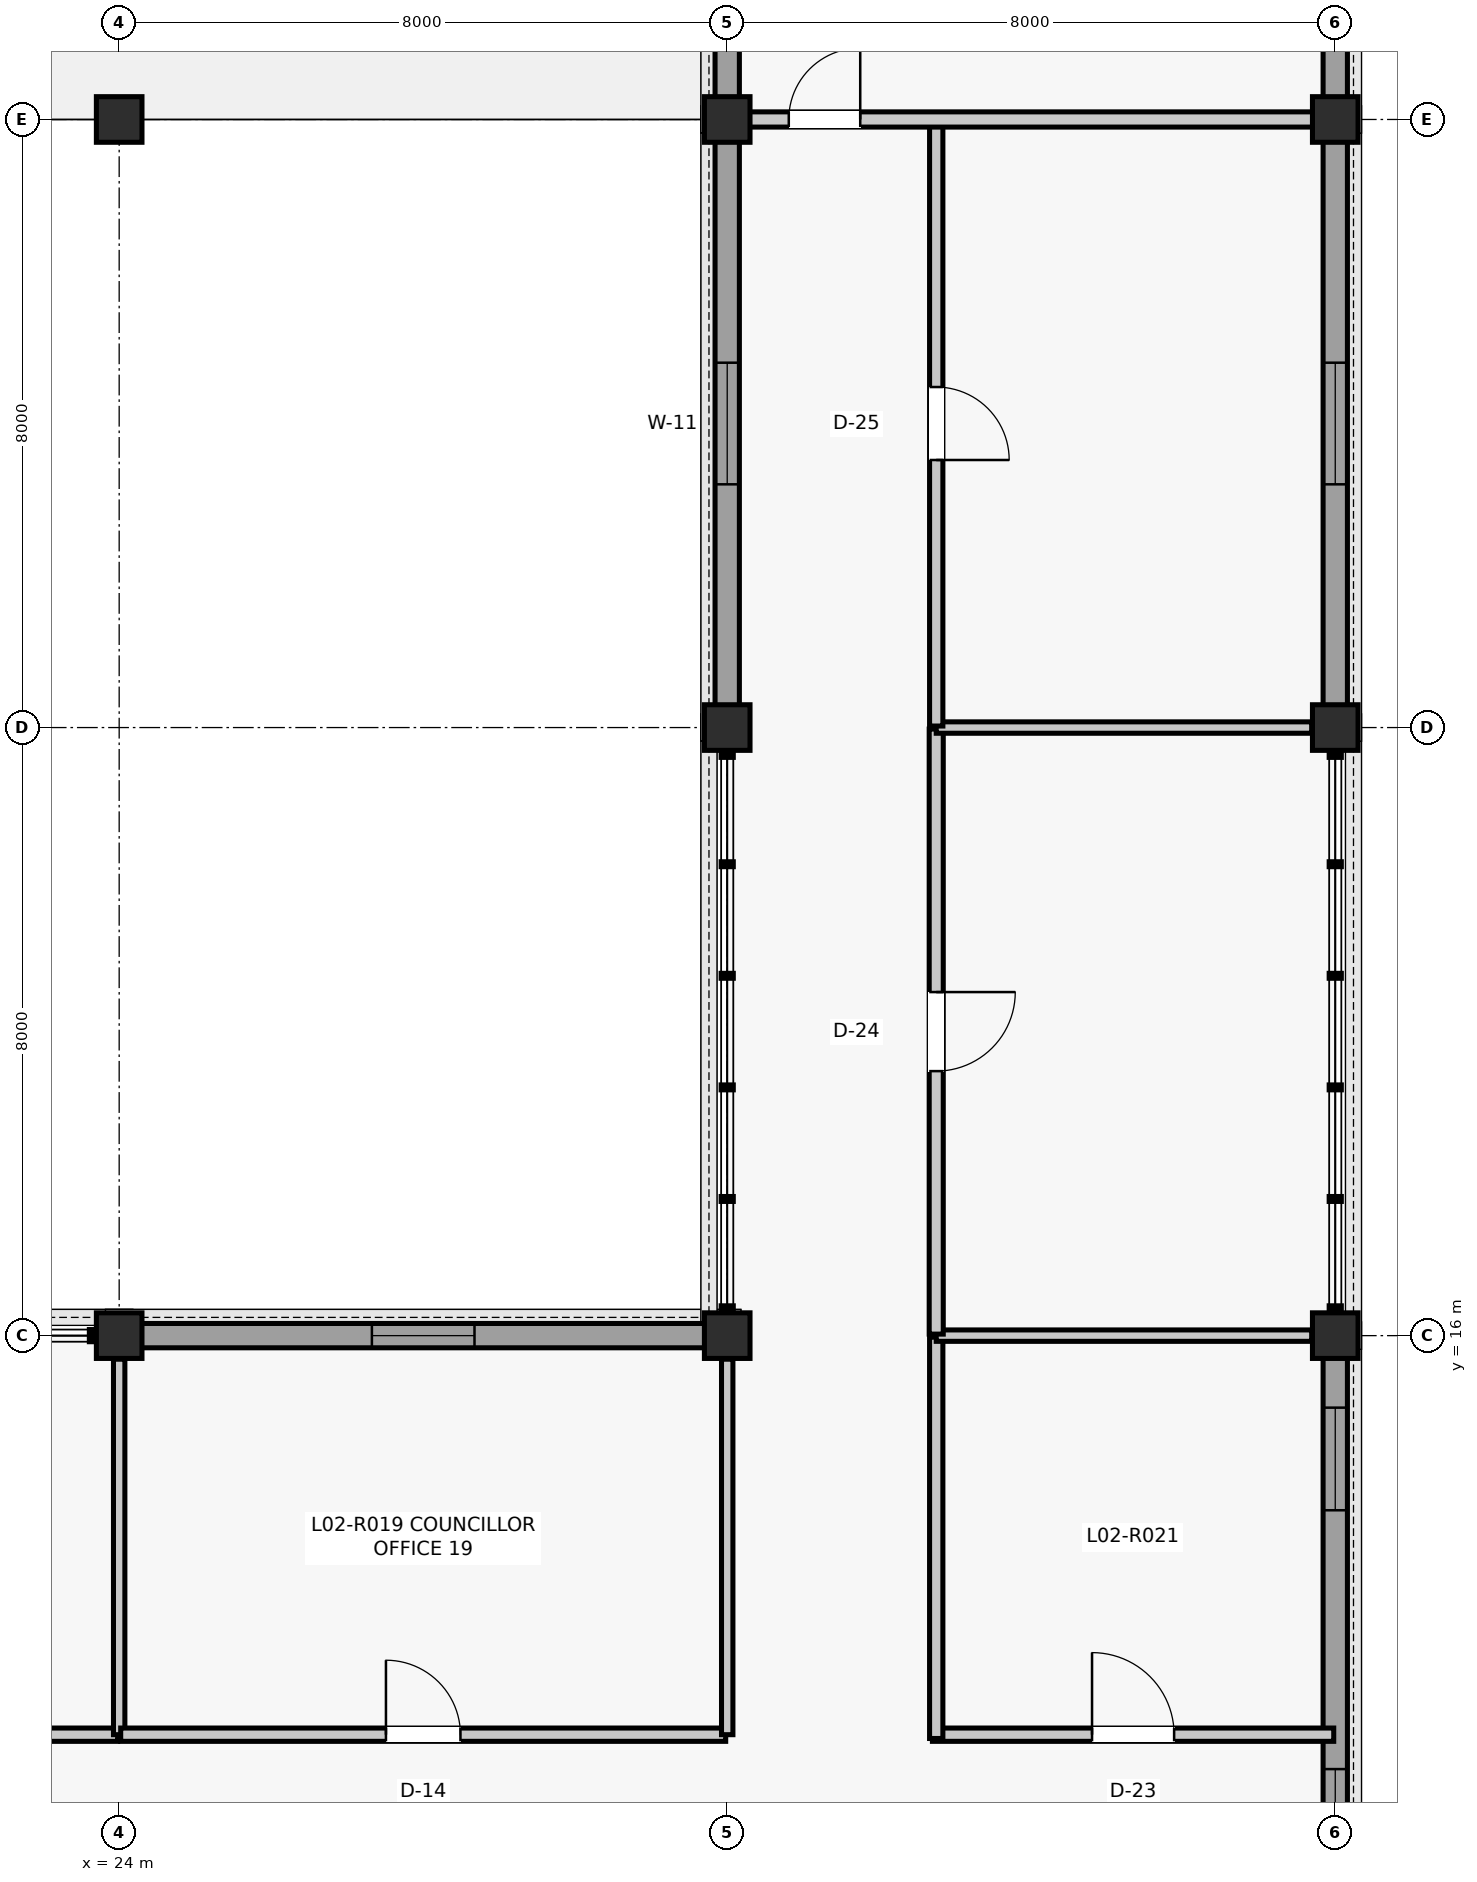
"""IFC4 building model, lengths in metres.
Left out: names, types, materials, properties, quantities, classifications, styles, units other than length and angle.
Written with IfcOpenShell. Run it as: python <this file> out.ifc"""

import sys

from ifc_helpers import new_model, si_unit, direction, frame, frame_2d, origin, origin_2d, place, context, subcontext, project, spatial, rectangle, extrude, element, fill, save


model = new_model("IFC4")
c1 = context("Model", 3, precision=1e-05, world=origin(), true_north=direction((0.0, 1.0)))
c2 = subcontext(c1, "Body", "Model", "MODEL_VIEW")
j1 = project(units=[si_unit("LENGTHUNIT", "METRE"), si_unit("PLANEANGLEUNIT", "RADIAN")], contexts=[c1])
p1 = place(None, origin())
s1 = spatial("IfcSite", under=j1, at=p1, CompositionType="ELEMENT")
p2 = place(p1, origin())
s2 = spatial("IfcBuilding", under=s1, at=p2, CompositionType="ELEMENT")
p3 = place(p2, frame((0.0, 0.0, 9.9)))
s3 = spatial("IfcBuildingStorey", under=s2, at=p3, CompositionType="ELEMENT", Elevation=9.9)
for number, where, z_axis, x_axis in (
    (1, (24.0, 16.0, 0.0), (0.0, 0.0, 1.0), (1.0, 0.0, 0.0)),
    (2, (24.0, 32.0, 0.0), (0.0, 0.0, 1.0), (1.0, 0.0, 0.0)),
    (3, (32.0, 16.0, 0.0), (0.0, 0.0, 1.0), (1.0, 0.0, 0.0)),
    (4, (32.0, 24.0, 0.0), (0.0, 0.0, 1.0), (1.0, 0.0, 0.0)),
    (5, (32.0, 32.0, 0.0), (0.0, 0.0, 1.0), (1.0, 0.0, 0.0)),
    (6, (40.0, 16.0, 0.0), (0.0, 0.0, 1.0), (1.0, 0.0, 0.0)),
    (7, (40.0, 24.0, 0.0), (0.0, 0.0, 1.0), (1.0, 0.0, 0.0)),
    (8, (40.0, 32.0, 0.0), (0.0, 0.0, 1.0), (1.0, 0.0, 0.0)),
):
    element("IfcColumn", number, at=place(p3, frame(where, z_axis=z_axis, x_axis=x_axis)), inside=s3, PredefinedType="COLUMN", context=c2, shape_type="SweptSolid", body=[
        extrude(rectangle(XDim=0.6, YDim=0.6, at=origin_2d()), origin(), (0.0, 0.0, 1.0), 3.96),
    ])
p4 = place(p3, frame((24.285, 16.0, 0.0), z_axis=(0.0, 0.0, 1.0), x_axis=(1.0, 0.0, 0.0)))
e9 = element("IfcWall", 9, at=p4, inside=s3, PredefinedType="SOLIDWALL", context=c2, shape_type="SweptSolid", body=[
    extrude(rectangle(XDim=7.43, YDim=0.32, at=frame_2d((3.715, 0.0))), origin(), (0.0, 0.0, 1.0), 3.179),
])
p5 = place(p4, frame((3.04, 0.0, 0.9)))
e10 = element("IfcOpeningElement", 10, at=p5, cuts=e9, PredefinedType="OPENING", context=c2, shape_type="SweptSolid", body=[
    extrude(rectangle(XDim=1.35, YDim=1.9, at=frame_2d((0.675, 0.95))), frame((0.0, 0.17, 0.0), z_axis=(0.0, -1.0, 0.0), x_axis=(1.0, 0.0, 0.0)), (0.0, 0.0, 1.0), 0.34),
])
p6 = place(p3, frame((40.0, 8.285, 0.0), z_axis=(0.0, 0.0, 1.0), x_axis=(0.0, 1.0, 0.0)))
e11 = element("IfcWall", 11, at=p6, inside=s3, PredefinedType="SOLIDWALL", context=c2, shape_type="SweptSolid", body=[
    extrude(rectangle(XDim=7.43, YDim=0.32, at=frame_2d((3.715, 0.0))), origin(), (0.0, 0.0, 1.0), 3.295),
])
p7 = place(p6, frame((0.662, 0.0, 0.95)))
e12 = element("IfcOpeningElement", 12, at=p7, cuts=e11, PredefinedType="OPENING", context=c2, shape_type="SweptSolid", body=[
    extrude(rectangle(XDim=1.35, YDim=1.9, at=frame_2d((0.675, 0.95))), frame((0.0, 0.17, 0.0), z_axis=(0.0, -1.0, 0.0), x_axis=(1.0, 0.0, 0.0)), (0.0, 0.0, 1.0), 0.34),
])
p8 = place(p6, frame((5.417, 0.0, 0.95)))
e13 = element("IfcOpeningElement", 13, at=p8, cuts=e11, PredefinedType="OPENING", context=c2, shape_type="SweptSolid", body=[
    extrude(rectangle(XDim=1.35, YDim=1.9, at=frame_2d((0.675, 0.95))), frame((0.0, 0.17, 0.0), z_axis=(0.0, -1.0, 0.0), x_axis=(1.0, 0.0, 0.0)), (0.0, 0.0, 1.0), 0.34),
])
p9 = place(p3, frame((32.0, 24.285, 0.0), z_axis=(0.0, 0.0, 1.0), x_axis=(0.0, 1.0, 0.0)))
e14 = element("IfcWall", 14, at=p9, inside=s3, PredefinedType="SOLIDWALL", context=c2, shape_type="SweptSolid", body=[
    extrude(rectangle(XDim=7.43, YDim=0.32, at=frame_2d((3.715, 0.0))), origin(), (0.0, 0.0, 1.0), 3.243),
])
p10 = place(p9, frame((2.915, 0.0, 0.9)))
e15 = element("IfcOpeningElement", 15, at=p10, cuts=e14, PredefinedType="OPENING", context=c2, shape_type="SweptSolid", body=[
    extrude(rectangle(XDim=1.6, YDim=2.0, at=frame_2d((0.8, 1.0))), frame((0.0, 0.17, 0.0), z_axis=(0.0, -1.0, 0.0), x_axis=(1.0, 0.0, 0.0)), (0.0, 0.0, 1.0), 0.34),
])
p11 = place(p3, frame((40.0, 24.285, 0.0), z_axis=(0.0, 0.0, 1.0), x_axis=(0.0, 1.0, 0.0)))
e16 = element("IfcWall", 16, at=p11, inside=s3, PredefinedType="SOLIDWALL", context=c2, shape_type="SweptSolid", body=[
    extrude(rectangle(XDim=7.43, YDim=0.32, at=frame_2d((3.715, 0.0))), origin(), (0.0, 0.0, 1.0), 3.299),
])
p12 = place(p11, frame((2.915, 0.0, 0.9)))
e17 = element("IfcOpeningElement", 17, at=p12, cuts=e16, PredefinedType="OPENING", context=c2, shape_type="SweptSolid", body=[
    extrude(rectangle(XDim=1.6, YDim=2.0, at=frame_2d((0.8, 1.0))), frame((0.0, 0.17, 0.0), z_axis=(0.0, -1.0, 0.0), x_axis=(1.0, 0.0, 0.0)), (0.0, 0.0, 1.0), 0.34),
])
p13 = place(p3, frame((32.0, 32.285, 0.0), z_axis=(0.0, 0.0, 1.0), x_axis=(0.0, 1.0, 0.0)))
e18 = element("IfcWall", 18, at=p13, inside=s3, PredefinedType="SOLIDWALL", context=c2, shape_type="SweptSolid", body=[
    extrude(rectangle(XDim=7.43, YDim=0.32, at=frame_2d((3.715, 0.0))), origin(), (0.0, 0.0, 1.0), 3.299),
])
p14 = place(p13, frame((2.965, 0.0, 0.9)))
e19 = element("IfcOpeningElement", 19, at=p14, cuts=e18, PredefinedType="OPENING", context=c2, shape_type="SweptSolid", body=[
    extrude(rectangle(XDim=1.5, YDim=1.9, at=frame_2d((0.75, 0.95))), frame((0.0, 0.17, 0.0), z_axis=(0.0, -1.0, 0.0), x_axis=(1.0, 0.0, 0.0)), (0.0, 0.0, 1.0), 0.34),
])
p15 = place(p3, frame((40.0, 32.285, 0.0), z_axis=(0.0, 0.0, 1.0), x_axis=(0.0, 1.0, 0.0)))
e20 = element("IfcWall", 20, at=p15, inside=s3, PredefinedType="SOLIDWALL", context=c2, shape_type="SweptSolid", body=[
    extrude(rectangle(XDim=7.43, YDim=0.32, at=frame_2d((3.715, 0.0))), origin(), (0.0, 0.0, 1.0), 3.362),
])
p16 = place(p15, frame((2.965, 0.0, 0.9)))
e21 = element("IfcOpeningElement", 21, at=p16, cuts=e20, PredefinedType="OPENING", context=c2, shape_type="SweptSolid", body=[
    extrude(rectangle(XDim=1.5, YDim=1.9, at=frame_2d((0.75, 0.95))), frame((0.0, 0.17, 0.0), z_axis=(0.0, -1.0, 0.0), x_axis=(1.0, 0.0, 0.0)), (0.0, 0.0, 1.0), 0.34),
])
p17 = place(p3, frame((16.02, 10.75, 0.0), z_axis=(0.0, 0.0, 1.0), x_axis=(1.0, 0.0, 0.0)))
e22 = element("IfcWall", 22, at=p17, inside=s3, PredefinedType="PARTITIONING", context=c2, shape_type="SweptSolid", body=[
    extrude(rectangle(XDim=7.96, YDim=0.175, at=frame_2d((3.98, 0.0))), origin(), (0.0, 0.0, 1.0), 3.172),
])
p18 = place(p17, frame((3.355, 0.0, 0.0)))
e23 = element("IfcOpeningElement", 23, at=p18, cuts=e22, PredefinedType="OPENING", context=c2, shape_type="SweptSolid", body=[
    extrude(rectangle(XDim=1.25, YDim=2.18, at=frame_2d((0.625, 1.09))), frame((0.0, 0.097, 0.0), z_axis=(0.0, -1.0, 0.0), x_axis=(1.0, 0.0, 0.0)), (0.0, 0.0, 1.0), 0.195),
])
p19 = place(p3, frame((24.0, 10.75, 0.0), z_axis=(0.0, 0.0, 1.0), x_axis=(0.0, 1.0, 0.0)))
e24 = element("IfcWall", 24, at=p19, inside=s3, PredefinedType="PARTITIONING", context=c2, shape_type="SweptSolid", body=[
    extrude(rectangle(XDim=4.94, YDim=0.15, at=frame_2d((2.47, 0.0))), origin(), (0.0, 0.0, 1.0), 3.172),
])
p20 = place(p3, frame((24.02, 10.75, 0.0), z_axis=(0.0, 0.0, 1.0), x_axis=(1.0, 0.0, 0.0)))
e25 = element("IfcWall", 25, at=p20, inside=s3, PredefinedType="PARTITIONING", context=c2, shape_type="SweptSolid", body=[
    extrude(rectangle(XDim=7.96, YDim=0.175, at=frame_2d((3.98, 0.0))), origin(), (0.0, 0.0, 1.0), 3.172),
])
p21 = place(p20, frame((3.49, 0.0, 0.0)))
e26 = element("IfcOpeningElement", 26, at=p21, cuts=e25, PredefinedType="OPENING", context=c2, shape_type="SweptSolid", body=[
    extrude(rectangle(XDim=0.98, YDim=2.15, at=frame_2d((0.49, 1.075))), frame((0.0, 0.097, 0.0), z_axis=(0.0, -1.0, 0.0), x_axis=(1.0, 0.0, 0.0)), (0.0, 0.0, 1.0), 0.195),
])
p22 = place(p3, frame((32.0, 10.75, 0.0), z_axis=(0.0, 0.0, 1.0), x_axis=(0.0, 1.0, 0.0)))
e27 = element("IfcWall", 27, at=p22, inside=s3, PredefinedType="PARTITIONING", context=c2, shape_type="SweptSolid", body=[
    extrude(rectangle(XDim=4.94, YDim=0.15, at=frame_2d((2.47, 0.0))), origin(), (0.0, 0.0, 1.0), 3.242),
])
p23 = place(p3, frame((34.7, 10.75, 0.0), z_axis=(0.0, 0.0, 1.0), x_axis=(1.0, 0.0, 0.0)))
e28 = element("IfcWall", 28, at=p23, inside=s3, PredefinedType="PARTITIONING", context=c2, shape_type="SweptSolid", body=[
    extrude(rectangle(XDim=5.28, YDim=0.175, at=frame_2d((2.64, 0.0))), origin(), (0.0, 0.0, 1.0), 3.288),
])
p24 = place(p23, frame((2.1, 0.0, 0.0)))
e29 = element("IfcOpeningElement", 29, at=p24, cuts=e28, PredefinedType="OPENING", context=c2, shape_type="SweptSolid", body=[
    extrude(rectangle(XDim=1.08, YDim=2.2, at=frame_2d((0.54, 1.1))), frame((0.0, 0.097, 0.0), z_axis=(0.0, -1.0, 0.0), x_axis=(1.0, 0.0, 0.0)), (0.0, 0.0, 1.0), 0.195),
])
p25 = place(p3, frame((34.75, 10.7, 0.0), z_axis=(0.0, 0.0, 1.0), x_axis=(0.0, 1.0, 0.0)))
e30 = element("IfcWall", 30, at=p25, inside=s3, PredefinedType="PARTITIONING", context=c2, shape_type="SweptSolid", body=[
    extrude(rectangle(XDim=5.28, YDim=0.175, at=frame_2d((2.64, 0.0))), origin(), (0.0, 0.0, 1.0), 3.156),
])
p26 = place(p3, frame((34.75, 16.0, 0.0), z_axis=(0.0, 0.0, 1.0), x_axis=(1.0, 0.0, 0.0)))
e31 = element("IfcWall", 31, at=p26, inside=s3, PredefinedType="PARTITIONING", context=c2, shape_type="SweptSolid", body=[
    extrude(rectangle(XDim=4.94, YDim=0.15, at=frame_2d((2.47, 0.0))), origin(), (0.0, 0.0, 1.0), 3.156),
])
p27 = place(p3, frame((34.75, 16.02, 0.0), z_axis=(0.0, 0.0, 1.0), x_axis=(0.0, 1.0, 0.0)))
e32 = element("IfcWall", 32, at=p27, inside=s3, PredefinedType="PARTITIONING", context=c2, shape_type="SweptSolid", body=[
    extrude(rectangle(XDim=7.96, YDim=0.185, at=frame_2d((3.98, 0.0))), origin(), (0.0, 0.0, 1.0), 3.156),
])
p28 = place(p27, frame((3.46, 0.0, 0.0)))
e33 = element("IfcOpeningElement", 33, at=p28, cuts=e32, PredefinedType="OPENING", context=c2, shape_type="SweptSolid", body=[
    extrude(rectangle(XDim=1.04, YDim=2.18, at=frame_2d((0.52, 1.09))), frame((0.0, 0.103, 0.0), z_axis=(0.0, -1.0, 0.0), x_axis=(1.0, 0.0, 0.0)), (0.0, 0.0, 1.0), 0.205),
])
p29 = place(p3, frame((34.75, 24.0, 0.0), z_axis=(0.0, 0.0, 1.0), x_axis=(1.0, 0.0, 0.0)))
e34 = element("IfcWall", 34, at=p29, inside=s3, PredefinedType="PARTITIONING", context=c2, shape_type="SweptSolid", body=[
    extrude(rectangle(XDim=4.94, YDim=0.15, at=frame_2d((2.47, 0.0))), origin(), (0.0, 0.0, 1.0), 3.166),
])
p30 = place(p3, frame((34.75, 24.02, 0.0), z_axis=(0.0, 0.0, 1.0), x_axis=(0.0, 1.0, 0.0)))
e35 = element("IfcWall", 35, at=p30, inside=s3, PredefinedType="PARTITIONING", context=c2, shape_type="SweptSolid", body=[
    extrude(rectangle(XDim=7.96, YDim=0.175, at=frame_2d((3.98, 0.0))), origin(), (0.0, 0.0, 1.0), 3.097),
])
p31 = place(p30, frame((3.5, 0.0, 0.0)))
e36 = element("IfcOpeningElement", 36, at=p31, cuts=e35, PredefinedType="OPENING", context=c2, shape_type="SweptSolid", body=[
    extrude(rectangle(XDim=0.96, YDim=2.14, at=frame_2d((0.48, 1.07))), frame((0.0, 0.097, 0.0), z_axis=(0.0, -1.0, 0.0), x_axis=(1.0, 0.0, 0.0)), (0.0, 0.0, 1.0), 0.195),
])
p32 = place(p3, frame((32.29, 32.0, 0.0), z_axis=(0.0, 0.0, 1.0), x_axis=(1.0, 0.0, 0.0)))
e37 = element("IfcWall", 37, at=p32, inside=s3, PredefinedType="PARTITIONING", context=c2, shape_type="SweptSolid", body=[
    extrude(rectangle(XDim=7.42, YDim=0.2, at=frame_2d((3.71, 0.0))), origin(), (0.0, 0.0, 1.0), 3.097),
])
p33 = place(p32, frame((0.52, 0.0, 0.0)))
e38 = element("IfcOpeningElement", 38, at=p33, cuts=e37, PredefinedType="OPENING", context=c2, shape_type="SweptSolid", body=[
    extrude(rectangle(XDim=0.94, YDim=2.12, at=frame_2d((0.47, 1.06))), frame((0.0, 0.11, 0.0), z_axis=(0.0, -1.0, 0.0), x_axis=(1.0, 0.0, 0.0)), (0.0, 0.0, 1.0), 0.22),
])
p34 = place(p5, origin())
e39 = element("IfcWindow", 39, at=p34, inside=s3, PartitioningType="SINGLE_PANEL", PredefinedType="WINDOW", context=c2, shape_type="SweptSolid", body=[
    extrude(rectangle(XDim=1.35, YDim=1.9, at=frame_2d((0.675, 0.95))), frame((0.0, 0.03, 0.0), z_axis=(0.0, -1.0, 0.0), x_axis=(1.0, 0.0, 0.0)), (0.0, 0.0, 1.0), 0.06),
])
fill(e10, e39)
p35 = place(p7, origin())
e40 = element("IfcWindow", 40, at=p35, inside=s3, PartitioningType="SINGLE_PANEL", PredefinedType="WINDOW", context=c2, shape_type="SweptSolid", body=[
    extrude(rectangle(XDim=1.35, YDim=1.9, at=frame_2d((0.675, 0.95))), frame((0.0, 0.03, 0.0), z_axis=(0.0, -1.0, 0.0), x_axis=(1.0, 0.0, 0.0)), (0.0, 0.0, 1.0), 0.06),
])
fill(e12, e40)
p36 = place(p8, origin())
e41 = element("IfcWindow", 41, at=p36, inside=s3, PartitioningType="SINGLE_PANEL", PredefinedType="WINDOW", context=c2, shape_type="SweptSolid", body=[
    extrude(rectangle(XDim=1.35, YDim=1.9, at=frame_2d((0.675, 0.95))), frame((0.0, 0.03, 0.0), z_axis=(0.0, -1.0, 0.0), x_axis=(1.0, 0.0, 0.0)), (0.0, 0.0, 1.0), 0.06),
])
fill(e13, e41)
p37 = place(p10, origin())
e42 = element("IfcWindow", 42, at=p37, inside=s3, PartitioningType="SINGLE_PANEL", PredefinedType="WINDOW", context=c2, shape_type="SweptSolid", body=[
    extrude(rectangle(XDim=1.6, YDim=2.0, at=frame_2d((0.8, 1.0))), frame((0.0, 0.03, 0.0), z_axis=(0.0, -1.0, 0.0), x_axis=(1.0, 0.0, 0.0)), (0.0, 0.0, 1.0), 0.06),
])
fill(e15, e42)
p38 = place(p12, origin())
e43 = element("IfcWindow", 43, at=p38, inside=s3, PartitioningType="SINGLE_PANEL", PredefinedType="WINDOW", context=c2, shape_type="SweptSolid", body=[
    extrude(rectangle(XDim=1.6, YDim=2.0, at=frame_2d((0.8, 1.0))), frame((0.0, 0.03, 0.0), z_axis=(0.0, -1.0, 0.0), x_axis=(1.0, 0.0, 0.0)), (0.0, 0.0, 1.0), 0.06),
])
fill(e17, e43)
p39 = place(p21, origin())
e44 = element("IfcDoor", 44, at=p39, inside=s3, OperationType="SINGLE_SWING_LEFT", PredefinedType="DOOR", context=c2, shape_type="SweptSolid", body=[
    extrude(rectangle(XDim=0.98, YDim=2.15, at=frame_2d((0.49, 1.075))), frame((0.0, 0.025, 0.0), z_axis=(0.0, -1.0, 0.0), x_axis=(1.0, 0.0, 0.0)), (0.0, 0.0, 1.0), 0.05),
])
fill(e26, e44)
p40 = place(p24, origin())
e45 = element("IfcDoor", 45, at=p40, inside=s3, OperationType="SINGLE_SWING_LEFT", PredefinedType="DOOR", context=c2, shape_type="SweptSolid", body=[
    extrude(rectangle(XDim=1.08, YDim=2.2, at=frame_2d((0.54, 1.1))), frame((0.0, 0.025, 0.0), z_axis=(0.0, -1.0, 0.0), x_axis=(1.0, 0.0, 0.0)), (0.0, 0.0, 1.0), 0.05),
])
fill(e29, e45)
p41 = place(p28, frame((1.04, 0.0, 0.0), z_axis=(0.0, 0.0, 1.0), x_axis=(-1.0, 0.0, 0.0)))
e46 = element("IfcDoor", 46, at=p41, inside=s3, OperationType="SINGLE_SWING_RIGHT", PredefinedType="DOOR", context=c2, shape_type="SweptSolid", body=[
    extrude(rectangle(XDim=1.04, YDim=2.18, at=frame_2d((0.52, 1.09))), frame((0.0, 0.025, 0.0), z_axis=(0.0, -1.0, 0.0), x_axis=(1.0, 0.0, 0.0)), (0.0, 0.0, 1.0), 0.05),
])
fill(e33, e46)
p42 = place(p31, frame((0.96, 0.0, 0.0), z_axis=(0.0, 0.0, 1.0), x_axis=(-1.0, 0.0, 0.0)))
e47 = element("IfcDoor", 47, at=p42, inside=s3, OperationType="SINGLE_SWING_LEFT", PredefinedType="DOOR", context=c2, shape_type="SweptSolid", body=[
    extrude(rectangle(XDim=0.96, YDim=2.14, at=frame_2d((0.48, 1.07))), frame((0.0, 0.025, 0.0), z_axis=(0.0, -1.0, 0.0), x_axis=(1.0, 0.0, 0.0)), (0.0, 0.0, 1.0), 0.05),
])
fill(e36, e47)
p43 = place(p33, origin())
e48 = element("IfcDoor", 48, at=p43, inside=s3, OperationType="SINGLE_SWING_RIGHT", PredefinedType="DOOR", context=c2, shape_type="SweptSolid", body=[
    extrude(rectangle(XDim=0.94, YDim=2.12, at=frame_2d((0.47, 1.06))), frame((0.0, 0.025, 0.0), z_axis=(0.0, -1.0, 0.0), x_axis=(1.0, 0.0, 0.0)), (0.0, 0.0, 1.0), 0.05),
])
fill(e38, e48)
save(model, sys.argv[1])
